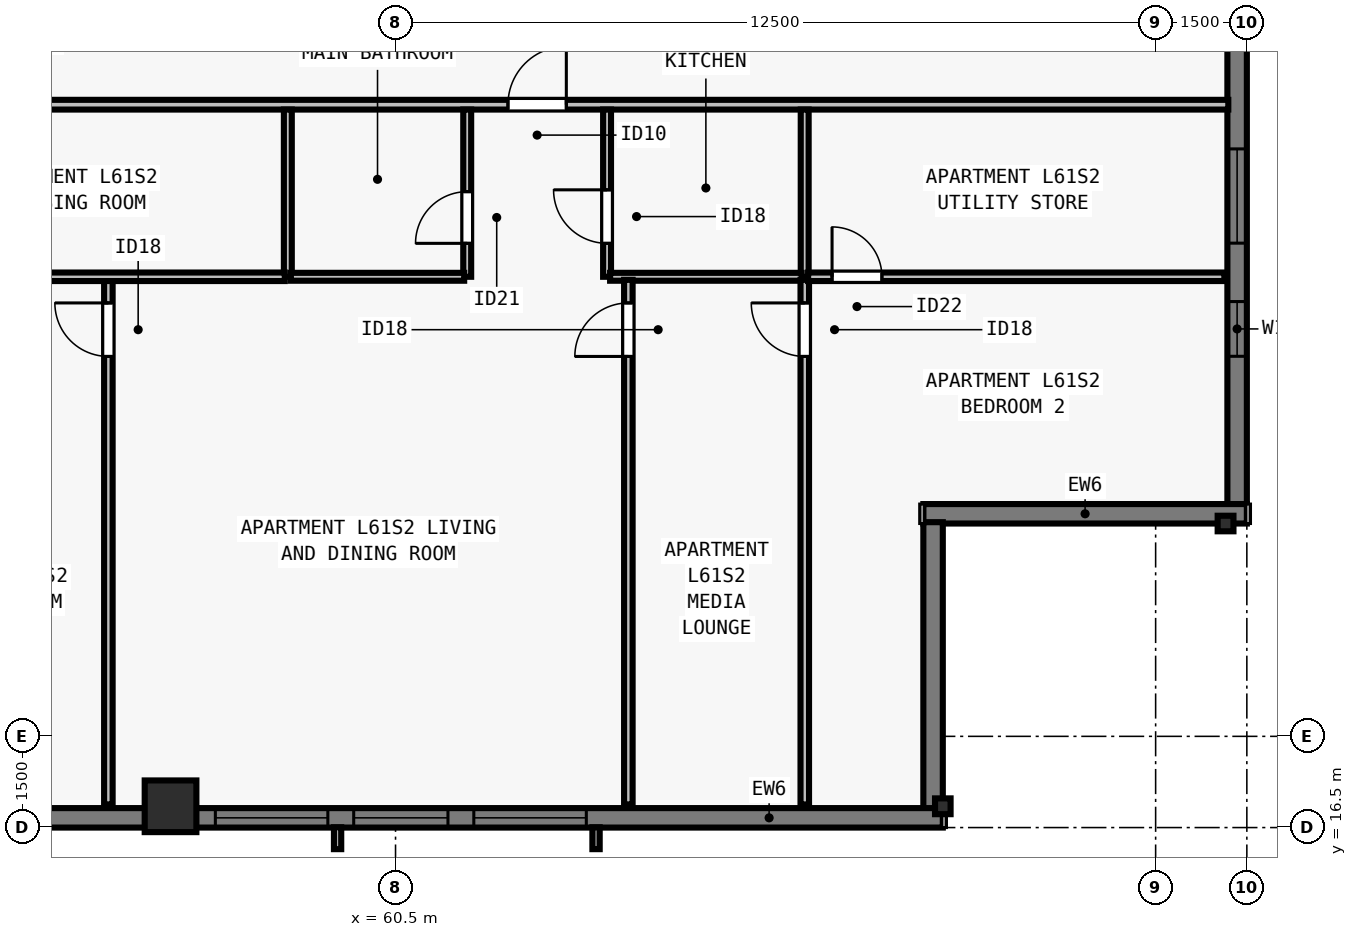
"""IFC4 building model, lengths in metres.
Left out: names, types, materials, properties, quantities, classifications, styles, units other than length and angle.
Written with IfcOpenShell. Run it as: python <this file> out.ifc"""

import sys

from ifc_helpers import new_model, si_unit, direction, frame, frame_2d, origin, origin_2d, place, context, subcontext, project, spatial, rectangle, i_section, extrude, element, fill, save


model = new_model("IFC4")
c1 = context("Model", 3, precision=1e-05, world=origin(), true_north=direction((0.0, 1.0)))
c2 = subcontext(c1, "Body", "Model", "MODEL_VIEW")
j1 = project(units=[si_unit("LENGTHUNIT", "METRE"), si_unit("PLANEANGLEUNIT", "RADIAN")], contexts=[c1])
p1 = place(None, origin())
s1 = spatial("IfcSite", under=j1, at=p1, CompositionType="ELEMENT")
p2 = place(p1, origin())
s2 = spatial("IfcBuilding", under=s1, at=p2, CompositionType="ELEMENT")
p3 = place(p2, frame((0.0, 0.0, 223.5)))
s3 = spatial("IfcBuildingStorey", under=s2, at=p3, CompositionType="ELEMENT", Elevation=223.5)
p4 = place(p3, frame((56.8, 16.85, 0.0), z_axis=(0.0, 0.0, 1.0), x_axis=(1.0, 0.0, 0.0)))
e1 = element("IfcColumn", 1, at=p4, inside=s3, PredefinedType="COLUMN", context=c2, shape_type="SweptSolid", body=[
    extrude(rectangle(XDim=0.85, YDim=0.85, at=origin_2d()), origin(), (0.0, 0.0, 1.0), 3.5),
])
for number, where, z_axis, x_axis in (
    (2, (69.5, 16.85, 0.0), (0.0, 0.0, 1.0), (1.0, 0.0, 0.0)),
    (3, (74.15, 21.5, 0.0), (0.0, 0.0, 1.0), (0.0, 1.0, 0.0)),
):
    element("IfcColumn", number, at=place(p3, frame(where, z_axis=z_axis, x_axis=x_axis)), inside=s3, PredefinedType="COLUMN", context=c2, shape_type="SweptSolid", body=[
        extrude(i_section(OverallWidth=0.256, OverallDepth=0.26, WebThickness=0.01, FlangeThickness=0.017, FilletRadius=0.013, at=origin_2d()), origin(), (0.0, 0.0, 1.0), 3.5),
    ])
p5 = place(p3, frame((74.34, 56.5, 0.0), z_axis=(0.0, 0.0, 1.0), x_axis=(0.0, -1.0, 0.0)))
e4 = element("IfcWall", 4, at=p5, inside=s3, PredefinedType="SOLIDWALL", context=c2, shape_type="SweptSolid", body=[
    extrude(rectangle(XDim=34.702, YDim=0.32, at=frame_2d((17.351, 0.0))), origin(), (0.0, 0.0, 1.0), 3.29),
])
p6 = place(p5, frame((4.613, 0.0, 0.8)))
e5 = element("IfcOpeningElement", 5, at=p6, cuts=e4, PredefinedType="OPENING", context=c2, shape_type="SweptSolid", body=[
    extrude(rectangle(XDim=1.85, YDim=1.678, at=frame_2d((0.925, 0.839))), frame((0.0, 0.17, 0.0), z_axis=(0.0, -1.0, 0.0), x_axis=(1.0, 0.0, 0.0)), (0.0, 0.0, 1.0), 0.34),
])
p7 = place(p5, frame((9.388, 0.0, 0.8)))
e6 = element("IfcOpeningElement", 6, at=p7, cuts=e4, PredefinedType="OPENING", context=c2, shape_type="SweptSolid", body=[
    extrude(rectangle(XDim=1.55, YDim=1.678, at=frame_2d((0.775, 0.839))), frame((0.0, 0.17, 0.0), z_axis=(0.0, -1.0, 0.0), x_axis=(1.0, 0.0, 0.0)), (0.0, 0.0, 1.0), 0.34),
])
p8 = place(p5, frame((14.888, 0.0, 0.8)))
e7 = element("IfcOpeningElement", 7, at=p8, cuts=e4, PredefinedType="OPENING", context=c2, shape_type="SweptSolid", body=[
    extrude(rectangle(XDim=1.55, YDim=1.678, at=frame_2d((0.775, 0.839))), frame((0.0, 0.17, 0.0), z_axis=(0.0, -1.0, 0.0), x_axis=(1.0, 0.0, 0.0)), (0.0, 0.0, 1.0), 0.34),
])
p9 = place(p5, frame((18.114, 0.0, 0.8)))
e8 = element("IfcOpeningElement", 8, at=p9, cuts=e4, PredefinedType="OPENING", context=c2, shape_type="SweptSolid", body=[
    extrude(rectangle(XDim=1.85, YDim=1.678, at=frame_2d((0.925, 0.839))), frame((0.0, 0.17, 0.0), z_axis=(0.0, -1.0, 0.0), x_axis=(1.0, 0.0, 0.0)), (0.0, 0.0, 1.0), 0.34),
])
p10 = place(p5, frame((23.614, 0.0, 0.8)))
e9 = element("IfcOpeningElement", 9, at=p10, cuts=e4, PredefinedType="OPENING", context=c2, shape_type="SweptSolid", body=[
    extrude(rectangle(XDim=1.85, YDim=1.678, at=frame_2d((0.925, 0.839))), frame((0.0, 0.17, 0.0), z_axis=(0.0, -1.0, 0.0), x_axis=(1.0, 0.0, 0.0)), (0.0, 0.0, 1.0), 0.34),
])
p11 = place(p5, frame((28.839, 0.0, 0.8)))
e10 = element("IfcOpeningElement", 10, at=p11, cuts=e4, PredefinedType="OPENING", context=c2, shape_type="SweptSolid", body=[
    extrude(rectangle(XDim=1.55, YDim=1.678, at=frame_2d((0.775, 0.839))), frame((0.0, 0.17, 0.0), z_axis=(0.0, -1.0, 0.0), x_axis=(1.0, 0.0, 0.0)), (0.0, 0.0, 1.0), 0.34),
])
p12 = place(p5, frame((31.35, 0.0, 0.8)))
e11 = element("IfcOpeningElement", 11, at=p12, cuts=e4, PredefinedType="OPENING", context=c2, shape_type="SweptSolid", body=[
    extrude(rectangle(XDim=0.9, YDim=1.678, at=frame_2d((0.45, 0.839))), frame((0.0, 0.17, 0.0), z_axis=(0.0, -1.0, 0.0), x_axis=(1.0, 0.0, 0.0)), (0.0, 0.0, 1.0), 0.34),
])
p13 = place(p3, frame((74.5, 21.66, 0.0), z_axis=(0.0, 0.0, 1.0), x_axis=(-1.0, 0.0, 0.0)))
e12 = element("IfcWall", 12, at=p13, inside=s3, PredefinedType="SOLIDWALL", context=c2, shape_type="SweptSolid", body=[
    extrude(rectangle(XDim=5.32, YDim=0.32, at=frame_2d((2.66, 0.0))), origin(), (0.0, 0.0, 1.0), 3.29),
])
p14 = place(p3, frame((69.34, 21.522, 0.0), z_axis=(0.0, 0.0, 1.0), x_axis=(0.0, -1.0, 0.0)))
e13 = element("IfcWall", 13, at=p14, inside=s3, PredefinedType="SOLIDWALL", context=c2, shape_type="SweptSolid", body=[
    extrude(rectangle(XDim=4.724, YDim=0.32, at=frame_2d((2.362, 0.0))), origin(), (0.0, 0.0, 1.0), 3.29),
])
p15 = place(p3, frame((69.5, 16.66, 0.0), z_axis=(0.0, 0.0, 1.0), x_axis=(-1.0, 0.0, 0.0)))
e14 = element("IfcWall", 14, at=p15, inside=s3, PredefinedType="SOLIDWALL", context=c2, shape_type="SweptSolid", body=[
    extrude(rectangle(XDim=34.702, YDim=0.32, at=frame_2d((17.351, 0.0))), origin(), (0.0, 0.0, 1.0), 3.29),
])
p16 = place(p15, frame((5.863, 0.0, 0.8)))
e15 = element("IfcOpeningElement", 15, at=p16, cuts=e14, PredefinedType="OPENING", context=c2, shape_type="SweptSolid", body=[
    extrude(rectangle(XDim=1.85, YDim=1.678, at=frame_2d((0.925, 0.839))), frame((0.0, 0.17, 0.0), z_axis=(0.0, -1.0, 0.0), x_axis=(1.0, 0.0, 0.0)), (0.0, 0.0, 1.0), 0.34),
])
p17 = place(p15, frame((8.138, 0.0, 0.8)))
e16 = element("IfcOpeningElement", 16, at=p17, cuts=e14, PredefinedType="OPENING", context=c2, shape_type="SweptSolid", body=[
    extrude(rectangle(XDim=1.55, YDim=1.678, at=frame_2d((0.775, 0.839))), frame((0.0, 0.17, 0.0), z_axis=(0.0, -1.0, 0.0), x_axis=(1.0, 0.0, 0.0)), (0.0, 0.0, 1.0), 0.34),
])
p18 = place(p15, frame((10.113, 0.0, 0.8)))
e17 = element("IfcOpeningElement", 17, at=p18, cuts=e14, PredefinedType="OPENING", context=c2, shape_type="SweptSolid", body=[
    extrude(rectangle(XDim=1.85, YDim=1.678, at=frame_2d((0.925, 0.839))), frame((0.0, 0.17, 0.0), z_axis=(0.0, -1.0, 0.0), x_axis=(1.0, 0.0, 0.0)), (0.0, 0.0, 1.0), 0.34),
])
p19 = place(p15, frame((14.888, 0.0, 0.8)))
e18 = element("IfcOpeningElement", 18, at=p19, cuts=e14, PredefinedType="OPENING", context=c2, shape_type="SweptSolid", body=[
    extrude(rectangle(XDim=1.55, YDim=1.678, at=frame_2d((0.775, 0.839))), frame((0.0, 0.17, 0.0), z_axis=(0.0, -1.0, 0.0), x_axis=(1.0, 0.0, 0.0)), (0.0, 0.0, 1.0), 0.34),
])
p20 = place(p15, frame((18.564, 0.0, 0.8)))
e19 = element("IfcOpeningElement", 19, at=p20, cuts=e14, PredefinedType="OPENING", context=c2, shape_type="SweptSolid", body=[
    extrude(rectangle(XDim=1.85, YDim=1.678, at=frame_2d((0.925, 0.839))), frame((0.0, 0.17, 0.0), z_axis=(0.0, -1.0, 0.0), x_axis=(1.0, 0.0, 0.0)), (0.0, 0.0, 1.0), 0.34),
])
p21 = place(p15, frame((24.414, 0.0, 0.8)))
e20 = element("IfcOpeningElement", 20, at=p21, cuts=e14, PredefinedType="OPENING", context=c2, shape_type="SweptSolid", body=[
    extrude(rectangle(XDim=1.85, YDim=1.678, at=frame_2d((0.925, 0.839))), frame((0.0, 0.17, 0.0), z_axis=(0.0, -1.0, 0.0), x_axis=(1.0, 0.0, 0.0)), (0.0, 0.0, 1.0), 0.34),
])
p22 = place(p15, frame((28.389, 0.0, 0.8)))
e21 = element("IfcOpeningElement", 21, at=p22, cuts=e14, PredefinedType="OPENING", context=c2, shape_type="SweptSolid", body=[
    extrude(rectangle(XDim=1.55, YDim=1.678, at=frame_2d((0.775, 0.839))), frame((0.0, 0.17, 0.0), z_axis=(0.0, -1.0, 0.0), x_axis=(1.0, 0.0, 0.0)), (0.0, 0.0, 1.0), 0.34),
])
p23 = place(p3, frame((29.805, 28.387, 0.0), z_axis=(0.0, 0.0, 1.0), x_axis=(1.0, 0.0, 0.0)))
e22 = element("IfcWall", 22, at=p23, inside=s3, PredefinedType="PARTITIONING", context=c2, shape_type="SweptSolid", body=[
    extrude(rectangle(XDim=44.39, YDim=0.16, at=frame_2d((22.195, 0.0))), origin(), (0.0, 0.0, 1.0), 2.958),
])
p24 = place(p23, frame((10.464, 0.0, 0.0)))
e23 = element("IfcOpeningElement", 23, at=p24, cuts=e22, PredefinedType="OPENING", context=c2, shape_type="SweptSolid", body=[
    extrude(rectangle(XDim=0.96, YDim=2.18, at=frame_2d((0.48, 1.09))), frame((0.0, 0.09, 0.0), z_axis=(0.0, -1.0, 0.0), x_axis=(1.0, 0.0, 0.0)), (0.0, 0.0, 1.0), 0.18),
])
p25 = place(p23, frame((32.544, 0.0, 0.0)))
e24 = element("IfcOpeningElement", 24, at=p25, cuts=e22, PredefinedType="OPENING", context=c2, shape_type="SweptSolid", body=[
    extrude(rectangle(XDim=0.96, YDim=2.18, at=frame_2d((0.48, 1.09))), frame((0.0, 0.09, 0.0), z_axis=(0.0, -1.0, 0.0), x_axis=(1.0, 0.0, 0.0)), (0.0, 0.0, 1.0), 0.18),
])
p26 = place(p3, frame((58.729, 25.558, 0.0), z_axis=(0.0, 0.0, 1.0), x_axis=(0.0, 1.0, 0.0)))
e25 = element("IfcWall", 25, at=p26, inside=s3, PredefinedType="PLUMBINGWALL", context=c2, shape_type="SweptSolid", body=[
    extrude(rectangle(XDim=2.75, YDim=0.13, at=frame_2d((1.375, 0.0))), origin(), (0.0, 0.0, 1.0), 3.29),
])
p27 = place(p3, frame((61.679, 25.558, 0.0), z_axis=(0.0, 0.0, 1.0), x_axis=(0.0, 1.0, 0.0)))
e26 = element("IfcWall", 26, at=p27, inside=s3, PredefinedType="PLUMBINGWALL", context=c2, shape_type="SweptSolid", body=[
    extrude(rectangle(XDim=2.75, YDim=0.13, at=frame_2d((1.375, 0.0))), origin(), (0.0, 0.0, 1.0), 3.29),
])
p28 = place(p27, frame((0.55, 0.0, 0.0)))
e27 = element("IfcOpeningElement", 27, at=p28, cuts=e26, PredefinedType="OPENING", context=c2, shape_type="SweptSolid", body=[
    extrude(rectangle(XDim=0.85, YDim=2.08, at=frame_2d((0.425, 1.04))), frame((0.0, 0.075, 0.0), z_axis=(0.0, -1.0, 0.0), x_axis=(1.0, 0.0, 0.0)), (0.0, 0.0, 1.0), 0.15),
])
p29 = place(p3, frame((58.779, 25.558, 0.0), z_axis=(0.0, 0.0, 1.0), x_axis=(1.0, 0.0, 0.0)))
e28 = element("IfcWall", 28, at=p29, inside=s3, PredefinedType="PLUMBINGWALL", context=c2, shape_type="SweptSolid", body=[
    extrude(rectangle(XDim=2.85, YDim=0.13, at=frame_2d((1.425, 0.0))), origin(), (0.0, 0.0, 1.0), 3.29),
])
p30 = place(p3, frame((67.229, 25.558, 0.0), z_axis=(0.0, 0.0, 1.0), x_axis=(0.0, 1.0, 0.0)))
e29 = element("IfcWall", 29, at=p30, inside=s3, PredefinedType="PLUMBINGWALL", context=c2, shape_type="SweptSolid", body=[
    extrude(rectangle(XDim=2.75, YDim=0.13, at=frame_2d((1.375, 0.0))), origin(), (0.0, 0.0, 1.0), 3.29),
])
p31 = place(p3, frame((63.979, 25.558, 0.0), z_axis=(0.0, 0.0, 1.0), x_axis=(0.0, 1.0, 0.0)))
e30 = element("IfcWall", 30, at=p31, inside=s3, PredefinedType="PLUMBINGWALL", context=c2, shape_type="SweptSolid", body=[
    extrude(rectangle(XDim=2.75, YDim=0.13, at=frame_2d((1.375, 0.0))), origin(), (0.0, 0.0, 1.0), 3.29),
])
p32 = place(p31, frame((0.55, 0.0, 0.0)))
e31 = element("IfcOpeningElement", 31, at=p32, cuts=e30, PredefinedType="OPENING", context=c2, shape_type="SweptSolid", body=[
    extrude(rectangle(XDim=0.88, YDim=2.1, at=frame_2d((0.44, 1.05))), frame((0.0, 0.075, 0.0), z_axis=(0.0, -1.0, 0.0), x_axis=(1.0, 0.0, 0.0)), (0.0, 0.0, 1.0), 0.15),
])
p33 = place(p3, frame((64.029, 25.558, 0.0), z_axis=(0.0, 0.0, 1.0), x_axis=(1.0, 0.0, 0.0)))
e32 = element("IfcWall", 32, at=p33, inside=s3, PredefinedType="PLUMBINGWALL", context=c2, shape_type="SweptSolid", body=[
    extrude(rectangle(XDim=3.15, YDim=0.13, at=frame_2d((1.575, 0.0))), origin(), (0.0, 0.0, 1.0), 3.29),
])
p34 = place(p3, frame((55.778, 16.88, 0.0), z_axis=(0.0, 0.0, 1.0), x_axis=(0.0, 1.0, 0.0)))
e33 = element("IfcWall", 33, at=p34, inside=s3, PredefinedType="PARTITIONING", context=c2, shape_type="SweptSolid", body=[
    extrude(rectangle(XDim=8.718, YDim=0.14, at=frame_2d((4.359, 0.0))), origin(), (0.0, 0.0, 1.0), 3.29),
])
p35 = place(p34, frame((7.367, 0.0, 0.0)))
e34 = element("IfcOpeningElement", 34, at=p35, cuts=e33, PredefinedType="OPENING", context=c2, shape_type="SweptSolid", body=[
    extrude(rectangle(XDim=0.88, YDim=2.1, at=frame_2d((0.44, 1.05))), frame((0.0, 0.08, 0.0), z_axis=(0.0, -1.0, 0.0), x_axis=(1.0, 0.0, 0.0)), (0.0, 0.0, 1.0), 0.16),
])
p36 = place(p3, frame((51.643, 25.558, 0.0), z_axis=(0.0, 0.0, 1.0), x_axis=(1.0, 0.0, 0.0)))
e35 = element("IfcWall", 35, at=p36, inside=s3, PredefinedType="PARTITIONING", context=c2, shape_type="SweptSolid", body=[
    extrude(rectangle(XDim=7.036, YDim=0.14, at=frame_2d((3.518, 0.0))), origin(), (0.0, 0.0, 1.0), 3.29),
])
p37 = place(p36, frame((0.335, 0.0, 0.0)))
e36 = element("IfcOpeningElement", 36, at=p37, cuts=e35, PredefinedType="OPENING", context=c2, shape_type="SweptSolid", body=[
    extrude(rectangle(XDim=0.82, YDim=2.1, at=frame_2d((0.41, 1.05))), frame((0.0, 0.08, 0.0), z_axis=(0.0, -1.0, 0.0), x_axis=(1.0, 0.0, 0.0)), (0.0, 0.0, 1.0), 0.16),
])
p38 = place(p3, frame((67.23, 16.88, 0.0), z_axis=(0.0, 0.0, 1.0), x_axis=(0.0, 1.0, 0.0)))
e37 = element("IfcWall", 37, at=p38, inside=s3, PredefinedType="PARTITIONING", context=c2, shape_type="SweptSolid", body=[
    extrude(rectangle(XDim=8.628, YDim=0.14, at=frame_2d((4.314, 0.0))), origin(), (0.0, 0.0, 1.0), 2.573),
])
p39 = place(p38, frame((7.367, 0.0, 0.0)))
e38 = element("IfcOpeningElement", 38, at=p39, cuts=e37, PredefinedType="OPENING", context=c2, shape_type="SweptSolid", body=[
    extrude(rectangle(XDim=0.88, YDim=2.1, at=frame_2d((0.44, 1.05))), frame((0.0, 0.08, 0.0), z_axis=(0.0, -1.0, 0.0), x_axis=(1.0, 0.0, 0.0)), (0.0, 0.0, 1.0), 0.16),
])
p40 = place(p3, frame((67.285, 25.558, 0.0), z_axis=(0.0, 0.0, 1.0), x_axis=(1.0, 0.0, 0.0)))
e39 = element("IfcWall", 39, at=p40, inside=s3, PredefinedType="PARTITIONING", context=c2, shape_type="SweptSolid", body=[
    extrude(rectangle(XDim=6.845, YDim=0.14, at=frame_2d((3.422, 0.0))), origin(), (0.0, 0.0, 1.0), 2.958),
])
p41 = place(p40, frame((0.394, 0.0, 0.0)))
e40 = element("IfcOpeningElement", 40, at=p41, cuts=e39, PredefinedType="OPENING", context=c2, shape_type="SweptSolid", body=[
    extrude(rectangle(XDim=0.82, YDim=2.1, at=frame_2d((0.41, 1.05))), frame((0.0, 0.08, 0.0), z_axis=(0.0, -1.0, 0.0), x_axis=(1.0, 0.0, 0.0)), (0.0, 0.0, 1.0), 0.16),
])
p42 = place(p3, frame((64.329, 16.88, 0.0), z_axis=(0.0, 0.0, 1.0), x_axis=(0.0, 1.0, 0.0)))
e41 = element("IfcWall", 41, at=p42, inside=s3, PredefinedType="PARTITIONING", context=c2, shape_type="SweptSolid", body=[
    extrude(rectangle(XDim=8.628, YDim=0.14, at=frame_2d((4.314, 0.0))), origin(), (0.0, 0.0, 1.0), 2.573),
])
p43 = place(p42, frame((7.367, 0.0, 0.0)))
e42 = element("IfcOpeningElement", 42, at=p43, cuts=e41, PredefinedType="OPENING", context=c2, shape_type="SweptSolid", body=[
    extrude(rectangle(XDim=0.88, YDim=2.1, at=frame_2d((0.44, 1.05))), frame((0.0, 0.08, 0.0), z_axis=(0.0, -1.0, 0.0), x_axis=(1.0, 0.0, 0.0)), (0.0, 0.0, 1.0), 0.16),
])
p44 = place(p11, origin())
e43 = element("IfcWindow", 43, at=p44, inside=s3, PartitioningType="SINGLE_PANEL", PredefinedType="WINDOW", context=c2, shape_type="SweptSolid", body=[
    extrude(rectangle(XDim=1.55, YDim=1.678, at=frame_2d((0.775, 0.839))), frame((0.0, -0.05, 0.0), z_axis=(0.0, -1.0, 0.0), x_axis=(1.0, 0.0, 0.0)), (0.0, 0.0, 1.0), 0.06),
])
fill(e10, e43)
p45 = place(p16, origin())
e44 = element("IfcWindow", 44, at=p45, inside=s3, PartitioningType="SINGLE_PANEL", PredefinedType="WINDOW", context=c2, shape_type="SweptSolid", body=[
    extrude(rectangle(XDim=1.85, YDim=1.678, at=frame_2d((0.925, 0.839))), frame((0.0, -0.05, 0.0), z_axis=(0.0, -1.0, 0.0), x_axis=(1.0, 0.0, 0.0)), (0.0, 0.0, 1.0), 0.06),
])
fill(e15, e44)
p46 = place(p17, origin())
e45 = element("IfcWindow", 45, at=p46, inside=s3, PartitioningType="SINGLE_PANEL", PredefinedType="WINDOW", context=c2, shape_type="SweptSolid", body=[
    extrude(rectangle(XDim=1.55, YDim=1.678, at=frame_2d((0.775, 0.839))), frame((0.0, -0.05, 0.0), z_axis=(0.0, -1.0, 0.0), x_axis=(1.0, 0.0, 0.0)), (0.0, 0.0, 1.0), 0.06),
])
fill(e16, e45)
p47 = place(p18, origin())
e46 = element("IfcWindow", 46, at=p47, inside=s3, PartitioningType="SINGLE_PANEL", PredefinedType="WINDOW", context=c2, shape_type="SweptSolid", body=[
    extrude(rectangle(XDim=1.85, YDim=1.678, at=frame_2d((0.925, 0.839))), frame((0.0, -0.05, 0.0), z_axis=(0.0, -1.0, 0.0), x_axis=(1.0, 0.0, 0.0)), (0.0, 0.0, 1.0), 0.06),
])
fill(e17, e46)
p48 = place(p12, origin())
e47 = element("IfcWindow", 47, at=p48, inside=s3, PartitioningType="SINGLE_PANEL", PredefinedType="WINDOW", context=c2, shape_type="SweptSolid", body=[
    extrude(rectangle(XDim=0.9, YDim=1.678, at=frame_2d((0.45, 0.839))), frame((0.0, -0.04, 0.0), z_axis=(0.0, -1.0, 0.0), x_axis=(1.0, 0.0, 0.0)), (0.0, 0.0, 1.0), 0.06),
])
fill(e11, e47)
p49 = place(p28, origin())
e48 = element("IfcDoor", 48, at=p49, inside=s3, OperationType="SINGLE_SWING_LEFT", PredefinedType="DOOR", context=c2, shape_type="SweptSolid", body=[
    extrude(rectangle(XDim=0.85, YDim=2.08, at=frame_2d((0.425, 1.04))), frame((0.0, 0.025, 0.0), z_axis=(0.0, -1.0, 0.0), x_axis=(1.0, 0.0, 0.0)), (0.0, 0.0, 1.0), 0.05),
])
fill(e27, e48)
p50 = place(p32, origin())
e49 = element("IfcDoor", 49, at=p50, inside=s3, OperationType="SINGLE_SWING_RIGHT", PredefinedType="DOOR", context=c2, shape_type="SweptSolid", body=[
    extrude(rectangle(XDim=0.88, YDim=2.1, at=frame_2d((0.44, 1.05))), frame((0.0, 0.025, 0.0), z_axis=(0.0, -1.0, 0.0), x_axis=(1.0, 0.0, 0.0)), (0.0, 0.0, 1.0), 0.05),
])
fill(e31, e49)
p51 = place(p35, origin())
e50 = element("IfcDoor", 50, at=p51, inside=s3, OperationType="SINGLE_SWING_RIGHT", PredefinedType="DOOR", context=c2, shape_type="SweptSolid", body=[
    extrude(rectangle(XDim=0.88, YDim=2.1, at=frame_2d((0.44, 1.05))), frame((0.0, 0.025, 0.0), z_axis=(0.0, -1.0, 0.0), x_axis=(1.0, 0.0, 0.0)), (0.0, 0.0, 1.0), 0.05),
])
fill(e34, e50)
p52 = place(p41, origin())
e51 = element("IfcDoor", 51, at=p52, inside=s3, OperationType="SINGLE_SWING_LEFT", PredefinedType="DOOR", context=c2, shape_type="SweptSolid", body=[
    extrude(rectangle(XDim=0.82, YDim=2.1, at=frame_2d((0.41, 1.05))), frame((0.0, 0.025, 0.0), z_axis=(0.0, -1.0, 0.0), x_axis=(1.0, 0.0, 0.0)), (0.0, 0.0, 1.0), 0.05),
])
fill(e40, e51)
p53 = place(p39, origin())
e52 = element("IfcDoor", 52, at=p53, inside=s3, OperationType="SINGLE_SWING_RIGHT", PredefinedType="DOOR", context=c2, shape_type="SweptSolid", body=[
    extrude(rectangle(XDim=0.88, YDim=2.1, at=frame_2d((0.44, 1.05))), frame((0.0, 0.025, 0.0), z_axis=(0.0, -1.0, 0.0), x_axis=(1.0, 0.0, 0.0)), (0.0, 0.0, 1.0), 0.05),
])
fill(e38, e52)
p54 = place(p43, origin())
e53 = element("IfcDoor", 53, at=p54, inside=s3, OperationType="SINGLE_SWING_LEFT", PredefinedType="DOOR", context=c2, shape_type="SweptSolid", body=[
    extrude(rectangle(XDim=0.88, YDim=2.1, at=frame_2d((0.44, 1.05))), frame((0.0, 0.025, 0.0), z_axis=(0.0, -1.0, 0.0), x_axis=(1.0, 0.0, 0.0)), (0.0, 0.0, 1.0), 0.05),
])
fill(e42, e53)
p55 = place(p25, origin())
e54 = element("IfcDoor", 54, at=p55, inside=s3, OperationType="SINGLE_SWING_RIGHT", PredefinedType="DOOR", context=c2, shape_type="SweptSolid", body=[
    extrude(rectangle(XDim=0.96, YDim=2.18, at=frame_2d((0.48, 1.09))), frame((0.0, 0.025, 0.0), z_axis=(0.0, -1.0, 0.0), x_axis=(1.0, 0.0, 0.0)), (0.0, 0.0, 1.0), 0.05),
])
fill(e24, e54)
save(model, sys.argv[1])
